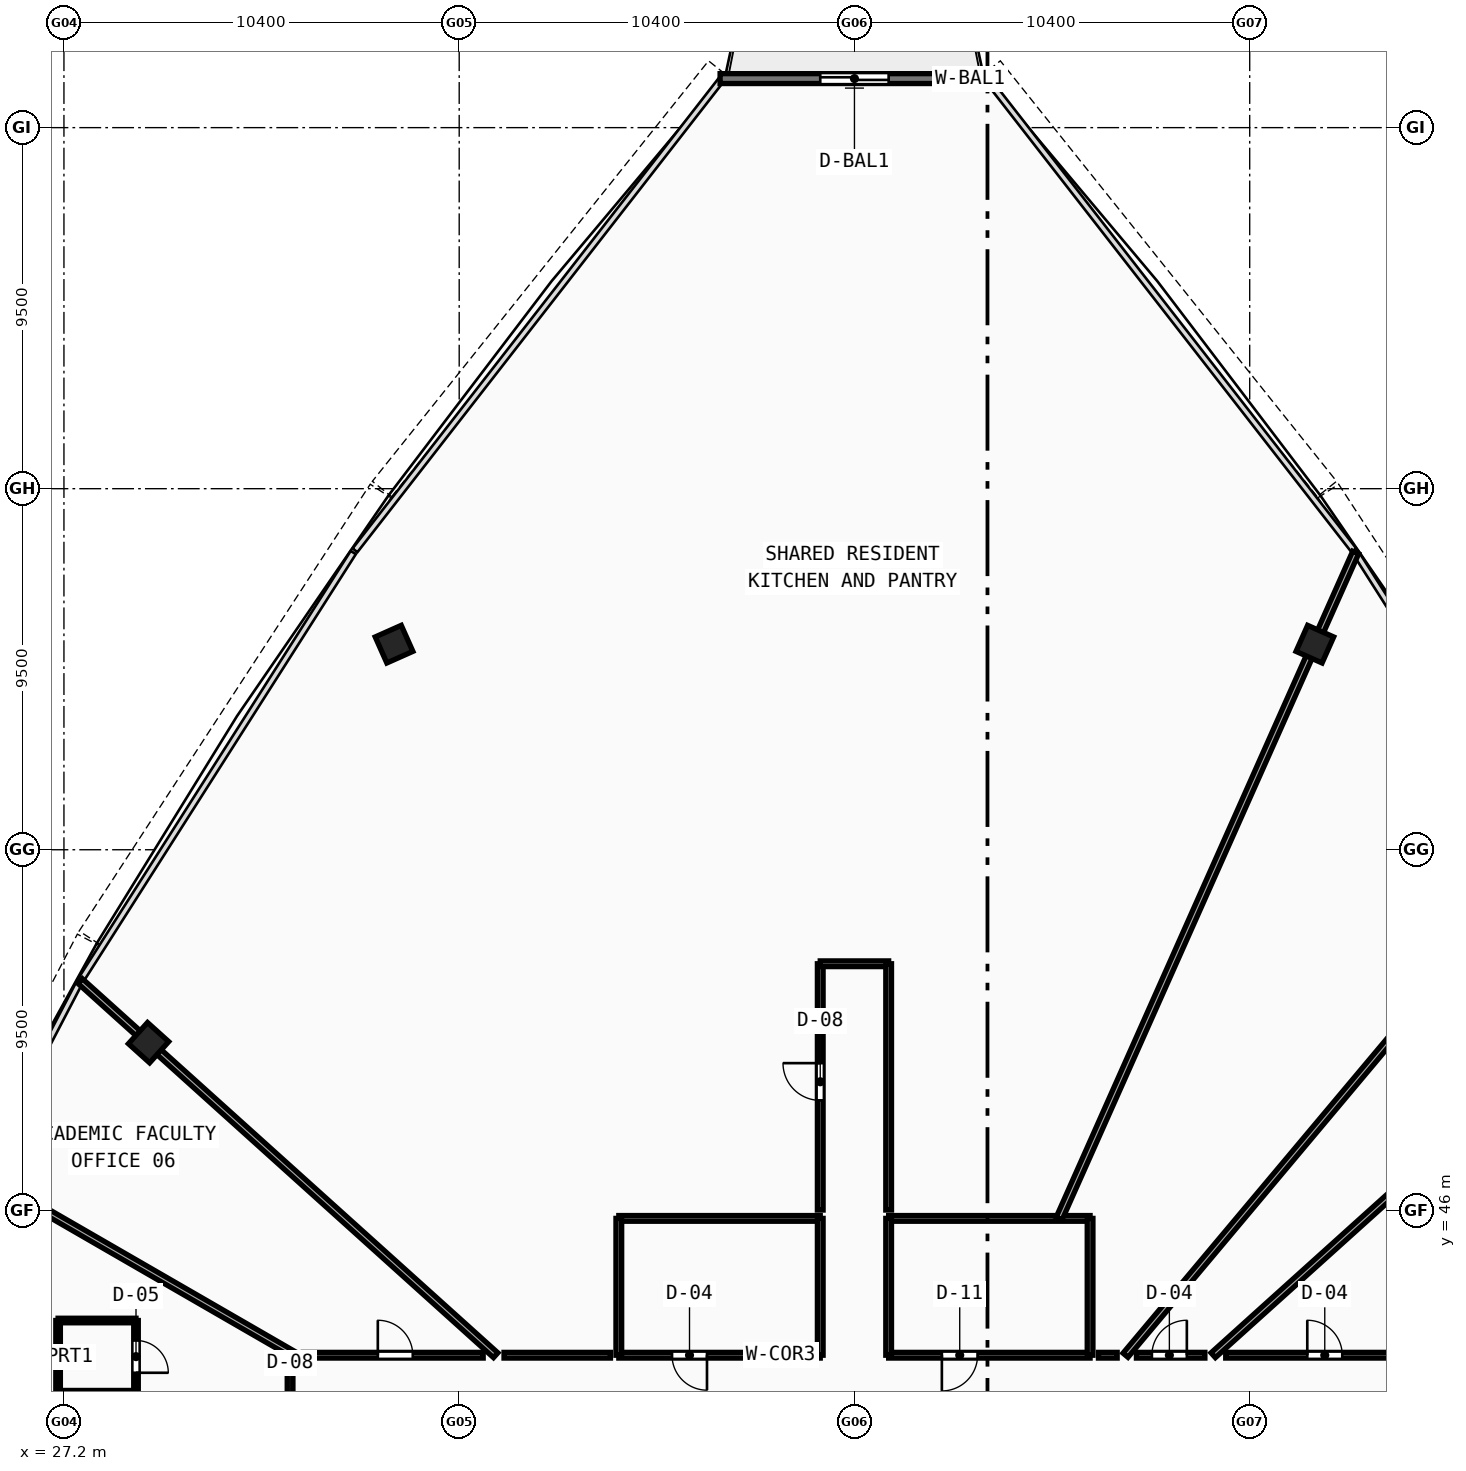
"""IFC4 building model, lengths in metres.
Left out: names, types, materials, properties, quantities, classifications, styles, units other than length and angle.
Written with IfcOpenShell. Run it as: python <this file> out.ifc"""

import sys

from ifc_helpers import new_model, si_unit, direction, frame, frame_2d, origin, origin_with_axes, origin_2d, place, context, subcontext, project, spatial, rectangle, hollow_rectangle, extrude, source, transform, mapped, element, fill, save


model = new_model("IFC4")
c1 = context("Model", 3, precision=1e-05, world=origin(), true_north=direction((0.0, 1.0)))
c2 = subcontext(c1, "Body", "Model", "MODEL_VIEW")
j1 = project(units=[si_unit("LENGTHUNIT", "METRE"), si_unit("PLANEANGLEUNIT", "RADIAN")], contexts=[c1])
p1 = place(None, origin())
s1 = spatial("IfcSite", under=j1, at=p1, CompositionType="ELEMENT")
p2 = place(p1, origin())
s2 = spatial("IfcBuilding", under=s1, at=p2, CompositionType="ELEMENT")
p3 = place(p2, frame((0.0, 0.0, 288.75)))
s3 = spatial("IfcBuildingStorey", under=s2, at=p3, CompositionType="ELEMENT", Elevation=288.75)
m1 = source(origin(), c2, "Body", "SweptSolid", [
    extrude(hollow_rectangle(XDim=0.75, YDim=0.75, WallThickness=0.028, at=origin_2d()), origin(), (0.0, 0.0, 1.0), 3.73),
])
for number, where, z_axis, x_axis in (
    (1, (60.114, 60.909, -0.26), (0.0, 0.0, 1.0), (-0.914, 0.407, 0.0)),
    (2, (35.886, 60.909, -0.26), (0.0, 0.0, 1.0), (-0.914, -0.407, 0.0)),
    (3, (29.427, 50.424, -0.26), (0.0, 0.0, 1.0), (-0.669, -0.743, 0.0)),
):
    element("IfcColumn", number, at=place(p3, frame(where, z_axis=z_axis, x_axis=x_axis)), inside=s3, PredefinedType="COLUMN", context=c2, shape_type="MappedRepresentation", body=[
        mapped(m1, transform((0.0, 0.0, 0.0), scale=1.0)),
    ])
p4 = place(p3, frame((51.535, 75.79, 0.0), z_axis=(0.0, 0.0, 1.0), x_axis=(-1.0, 0.0, 0.0)))
e4 = element("IfcWall", 4, at=p4, inside=s3, PredefinedType="STANDARD", context=c2, shape_type="SweptSolid", body=[
    extrude(rectangle(XDim=7.07, YDim=0.26, at=frame_2d((3.535, 0.0))), origin(), (0.0, 0.0, 1.0), 3.47),
])
p5 = place(p4, frame((2.635, 0.0, 0.0)))
e5 = element("IfcOpeningElement", 5, at=p5, cuts=e4, PredefinedType="OPENING", context=c2, shape_type="SweptSolid", body=[
    extrude(rectangle(XDim=1.8, YDim=2.15, at=frame_2d((0.9, 1.075))), frame((0.0, 0.14, 0.0), z_axis=(0.0, -1.0, 0.0), x_axis=(1.0, 0.0, 0.0)), (0.0, 0.0, 1.0), 0.28),
])
p6 = place(p3, frame((41.8, 42.2, 0.0), z_axis=(0.0, 0.0, 1.0), x_axis=(1.0, 0.0, 0.0)))
e6 = element("IfcWall", 6, at=p6, inside=s3, PredefinedType="PARTITIONING", context=c2, shape_type="SweptSolid", body=[
    extrude(rectangle(XDim=5.3, YDim=0.15, at=frame_2d((2.65, 0.0))), origin(), (0.0, 0.0, 1.0), 2.87),
])
p7 = place(p6, frame((1.4, 0.0, 0.0)))
e7 = element("IfcOpeningElement", 7, at=p7, cuts=e6, PredefinedType="OPENING", context=c2, shape_type="SweptSolid", body=[
    extrude(rectangle(XDim=0.92, YDim=2.1, at=frame_2d((0.46, 1.05))), frame((0.0, 0.085, 0.0), z_axis=(0.0, -1.0, 0.0), x_axis=(1.0, 0.0, 0.0)), (0.0, 0.0, 1.0), 0.17),
])
p8 = place(p3, frame((41.8, 45.8, 0.0), z_axis=(0.0, 0.0, 1.0), x_axis=(1.0, 0.0, 0.0)))
e8 = element("IfcWall", 8, at=p8, inside=s3, PredefinedType="PARTITIONING", context=c2, shape_type="SweptSolid", body=[
    extrude(rectangle(XDim=5.3, YDim=0.15, at=frame_2d((2.65, 0.0))), origin(), (0.0, 0.0, 1.0), 2.87),
])
for number, where, z_axis, x_axis in (
    (9, (41.8, 42.2, 0.0), (0.0, 0.0, 1.0), (0.0, 1.0, 0.0)),
    (10, (47.1, 42.2, 0.0), (0.0, 0.0, 1.0), (0.0, 1.0, 0.0)),
):
    element("IfcWall", number, at=place(p3, frame(where, z_axis=z_axis, x_axis=x_axis)), inside=s3, PredefinedType="PARTITIONING", context=c2, shape_type="SweptSolid", body=[
        extrude(rectangle(XDim=3.6, YDim=0.15, at=frame_2d((1.8, 0.0))), origin(), (0.0, 0.0, 1.0), 3.47),
    ])
p9 = place(p3, frame((48.9, 42.2, 0.0), z_axis=(0.0, 0.0, 1.0), x_axis=(1.0, 0.0, 0.0)))
e11 = element("IfcWall", 11, at=p9, inside=s3, PredefinedType="PARTITIONING", context=c2, shape_type="SweptSolid", body=[
    extrude(rectangle(XDim=5.3, YDim=0.15, at=frame_2d((2.65, 0.0))), origin(), (0.0, 0.0, 1.0), 2.87),
])
p10 = place(p9, frame((1.4, 0.0, 0.0)))
e12 = element("IfcOpeningElement", 12, at=p10, cuts=e11, PredefinedType="OPENING", context=c2, shape_type="SweptSolid", body=[
    extrude(rectangle(XDim=0.94, YDim=2.1, at=frame_2d((0.47, 1.05))), frame((0.0, 0.085, 0.0), z_axis=(0.0, -1.0, 0.0), x_axis=(1.0, 0.0, 0.0)), (0.0, 0.0, 1.0), 0.17),
])
p11 = place(p3, frame((48.9, 45.8, 0.0), z_axis=(0.0, 0.0, 1.0), x_axis=(1.0, 0.0, 0.0)))
e13 = element("IfcWall", 13, at=p11, inside=s3, PredefinedType="PARTITIONING", context=c2, shape_type="SweptSolid", body=[
    extrude(rectangle(XDim=5.3, YDim=0.15, at=frame_2d((2.65, 0.0))), origin(), (0.0, 0.0, 1.0), 2.87),
])
for number, where, z_axis, x_axis in (
    (14, (48.9, 42.2, 0.0), (0.0, 0.0, 1.0), (0.0, 1.0, 0.0)),
    (15, (54.2, 42.2, 0.0), (0.0, 0.0, 1.0), (0.0, 1.0, 0.0)),
):
    element("IfcWall", number, at=place(p3, frame(where, z_axis=z_axis, x_axis=x_axis)), inside=s3, PredefinedType="PARTITIONING", context=c2, shape_type="SweptSolid", body=[
        extrude(rectangle(XDim=3.6, YDim=0.15, at=frame_2d((1.8, 0.0))), origin(), (0.0, 0.0, 1.0), 3.47),
    ])
p12 = place(p3, frame((57.44, 42.2, 0.0), z_axis=(0.0, 0.0, 1.0), x_axis=(0.743145593795, 0.669129753055, 0.0)))
e16 = element("IfcWall", 16, at=p12, inside=s3, PredefinedType="PARTITIONING", context=c2, shape_type="SweptSolid", body=[
    extrude(rectangle(XDim=14.711, YDim=0.17, at=frame_2d((7.355, 0.0))), origin(), (0.0, 0.0, 1.0), 2.87),
])
p13 = place(p3, frame((55.132, 42.2, 0.0), z_axis=(0.0, 0.0, 1.0), x_axis=(0.642779182264, 0.766051514487, 0.0)))
e17 = element("IfcWall", 17, at=p13, inside=s3, PredefinedType="PARTITIONING", context=c2, shape_type="SweptSolid", body=[
    extrude(rectangle(XDim=17.254, YDim=0.17, at=frame_2d((8.627, 0.0))), origin(), (0.0, 0.0, 1.0), 2.87),
])
p14 = place(p3, frame((53.387, 45.8, 0.0), z_axis=(0.0, 0.0, 1.0), x_axis=(0.406740781751, 0.913543614975, 0.0)))
e18 = element("IfcWall", 18, at=p14, inside=s3, PredefinedType="PARTITIONING", context=c2, shape_type="SweptSolid", body=[
    extrude(rectangle(XDim=19.177, YDim=0.17, at=frame_2d((9.589, 0.0))), origin(), (0.0, 0.0, 1.0), 2.87),
])
p15 = place(p3, frame((38.56, 42.2, 0.0), z_axis=(0.0, 0.0, 1.0), x_axis=(-0.743145593795, 0.669129753055, 0.0)))
e19 = element("IfcWall", 19, at=p15, inside=s3, PredefinedType="PARTITIONING", context=c2, shape_type="SweptSolid", body=[
    extrude(rectangle(XDim=14.711, YDim=0.17, at=frame_2d((7.355, 0.0))), origin(), (0.0, 0.0, 1.0), 2.87),
])
p16 = place(p3, frame((33.278, 42.2, 0.0), z_axis=(0.0, 0.0, 1.0), x_axis=(-0.866033492747, 0.499985989244, 0.0)))
e20 = element("IfcWall", 20, at=p16, inside=s3, PredefinedType="PARTITIONING", context=c2, shape_type="SweptSolid", body=[
    extrude(rectangle(XDim=9.57, YDim=0.17, at=frame_2d((4.785, 0.0))), origin(), (0.0, 0.0, 1.0), 2.87),
])
p17 = place(p3, frame((33.15, 38.525, 0.0), z_axis=(0.0, 0.0, 1.0), x_axis=(-0.951060099206, 0.309005967092, 0.0)))
e21 = element("IfcWall", 21, at=p17, inside=s3, PredefinedType="PARTITIONING", context=c2, shape_type="SweptSolid", body=[
    extrude(rectangle(XDim=11.302, YDim=0.17, at=frame_2d((5.651, 0.0))), origin(), (0.0, 0.0, 1.0), 2.87),
])
p18 = place(p3, frame((33.15, 38.756, 0.0), z_axis=(0.0, 0.0, 1.0), x_axis=(0.0, 1.0, 0.0)))
e22 = element("IfcWall", 22, at=p18, inside=s3, PredefinedType="PARTITIONING", context=c2, shape_type="SweptSolid", body=[
    extrude(rectangle(XDim=3.263, YDim=0.15, at=frame_2d((1.632, 0.0))), origin(), (0.0, 0.0, 1.0), 3.12),
])
p19 = place(p18, frame((1.14, 0.0, 0.0)))
e23 = element("IfcOpeningElement", 23, at=p19, cuts=e22, PredefinedType="OPENING", context=c2, shape_type="SweptSolid", body=[
    extrude(rectangle(XDim=0.98, YDim=2.12, at=frame_2d((0.49, 1.06))), frame((0.0, 0.085, 0.0), z_axis=(0.0, -1.0, 0.0), x_axis=(1.0, 0.0, 0.0)), (0.0, 0.0, 1.0), 0.17),
])
p20 = place(p3, frame((33.497, 42.2, 0.0), z_axis=(0.0, 0.0, 1.0), x_axis=(1.0, 0.0, 0.0)))
e24 = element("IfcWall", 24, at=p20, inside=s3, PredefinedType="PARTITIONING", context=c2, shape_type="SweptSolid", body=[
    extrude(rectangle(XDim=4.734, YDim=0.15, at=frame_2d((2.367, 0.0))), origin(), (0.0, 0.0, 1.0), 3.12),
])
p21 = place(p20, frame((1.961, 0.0, 0.0)))
e25 = element("IfcOpeningElement", 25, at=p21, cuts=e24, PredefinedType="OPENING", context=c2, shape_type="SweptSolid", body=[
    extrude(rectangle(XDim=0.92, YDim=2.1, at=frame_2d((0.46, 1.05))), frame((0.0, 0.085, 0.0), z_axis=(0.0, -1.0, 0.0), x_axis=(1.0, 0.0, 0.0)), (0.0, 0.0, 1.0), 0.17),
])
p22 = place(p3, frame((38.78, 42.2, 0.0), z_axis=(0.0, 0.0, 1.0), x_axis=(1.0, 0.0, 0.0)))
e26 = element("IfcWall", 26, at=p22, inside=s3, PredefinedType="PARTITIONING", context=c2, shape_type="SweptSolid", body=[
    extrude(rectangle(XDim=2.801, YDim=0.15, at=frame_2d((1.4, 0.0))), origin(), (0.0, 0.0, 1.0), 2.87),
])
p23 = place(p3, frame((47.1, 46.02, 0.0), z_axis=(0.0, 0.0, 1.0), x_axis=(0.0, 1.0, 0.0)))
e27 = element("IfcWall", 27, at=p23, inside=s3, PredefinedType="PARTITIONING", context=c2, shape_type="SweptSolid", body=[
    extrude(rectangle(XDim=6.48, YDim=0.15, at=frame_2d((3.24, 0.0))), origin(), (0.0, 0.0, 1.0), 3.12),
])
p24 = place(p23, frame((2.885, 0.0, 0.0)))
e28 = element("IfcOpeningElement", 28, at=p24, cuts=e27, PredefinedType="OPENING", context=c2, shape_type="SweptSolid", body=[
    extrude(rectangle(XDim=0.98, YDim=2.12, at=frame_2d((0.49, 1.06))), frame((0.0, 0.085, 0.0), z_axis=(0.0, -1.0, 0.0), x_axis=(1.0, 0.0, 0.0)), (0.0, 0.0, 1.0), 0.17),
])
p25 = place(p3, frame((47.1, 52.5, 0.0), z_axis=(0.0, 0.0, 1.0), x_axis=(1.0, 0.0, 0.0)))
e29 = element("IfcWall", 29, at=p25, inside=s3, PredefinedType="PARTITIONING", context=c2, shape_type="SweptSolid", body=[
    extrude(rectangle(XDim=1.8, YDim=0.15, at=frame_2d((0.9, 0.0))), origin(), (0.0, 0.0, 1.0), 3.47),
])
p26 = place(p3, frame((48.9, 52.5, 0.0), z_axis=(0.0, 0.0, 1.0), x_axis=(0.0, -1.0, 0.0)))
e30 = element("IfcWall", 30, at=p26, inside=s3, PredefinedType="PARTITIONING", context=c2, shape_type="SweptSolid", body=[
    extrude(rectangle(XDim=6.48, YDim=0.15, at=frame_2d((3.24, 0.0))), origin(), (0.0, 0.0, 1.0), 3.12),
])
p27 = place(p3, frame((54.42, 42.2, 0.0), z_axis=(0.0, 0.0, 1.0), x_axis=(1.0, 0.0, 0.0)))
e31 = element("IfcWall", 31, at=p27, inside=s3, PredefinedType="PARTITIONING", context=c2, shape_type="SweptSolid", body=[
    extrude(rectangle(XDim=0.492, YDim=0.15, at=frame_2d((0.246, 0.0))), origin(), (0.0, 0.0, 1.0), 3.47),
])
p28 = place(p3, frame((55.419, 42.2, 0.0), z_axis=(0.0, 0.0, 1.0), x_axis=(1.0, 0.0, 0.0)))
e32 = element("IfcWall", 32, at=p28, inside=s3, PredefinedType="PARTITIONING", context=c2, shape_type="SweptSolid", body=[
    extrude(rectangle(XDim=1.801, YDim=0.15, at=frame_2d((0.9, 0.0))), origin(), (0.0, 0.0, 1.0), 2.87),
])
p29 = place(p28, frame((0.407, 0.0, 0.0)))
e33 = element("IfcOpeningElement", 33, at=p29, cuts=e32, PredefinedType="OPENING", context=c2, shape_type="SweptSolid", body=[
    extrude(rectangle(XDim=0.92, YDim=2.1, at=frame_2d((0.46, 1.05))), frame((0.0, 0.085, 0.0), z_axis=(0.0, -1.0, 0.0), x_axis=(1.0, 0.0, 0.0)), (0.0, 0.0, 1.0), 0.17),
])
p30 = place(p3, frame((57.769, 42.2, 0.0), z_axis=(0.0, 0.0, 1.0), x_axis=(1.0, 0.0, 0.0)))
e34 = element("IfcWall", 34, at=p30, inside=s3, PredefinedType="PARTITIONING", context=c2, shape_type="SweptSolid", body=[
    extrude(rectangle(XDim=5.081, YDim=0.15, at=frame_2d((2.541, 0.0))), origin(), (0.0, 0.0, 1.0), 3.12),
])
p31 = place(p30, frame((2.146, 0.0, 0.0)))
e35 = element("IfcOpeningElement", 35, at=p31, cuts=e34, PredefinedType="OPENING", context=c2, shape_type="SweptSolid", body=[
    extrude(rectangle(XDim=0.92, YDim=2.1, at=frame_2d((0.46, 1.05))), frame((0.0, 0.085, 0.0), z_axis=(0.0, -1.0, 0.0), x_axis=(1.0, 0.0, 0.0)), (0.0, 0.0, 1.0), 0.17),
])
p32 = place(p3, frame((27.046, 41.213, 0.0), z_axis=(0.0, 0.0, 1.0), x_axis=(1.0, 0.0, 0.0)))
e36 = element("IfcWall", 36, at=p32, inside=s3, PredefinedType="PARTITIONING", context=c2, shape_type="SweptSolid", body=[
    extrude(rectangle(XDim=2.05, YDim=0.12, at=frame_2d((1.025, 0.0))), origin(), (0.0, 0.0, 1.0), 3.12),
])
p33 = place(p3, frame((29.096, 41.213, 0.0), z_axis=(0.0, 0.0, 1.0), x_axis=(0.0, 1.0, 0.0)))
e37 = element("IfcWall", 37, at=p33, inside=s3, PredefinedType="PARTITIONING", context=c2, shape_type="SweptSolid", body=[
    extrude(rectangle(XDim=1.9, YDim=0.12, at=frame_2d((0.95, 0.0))), origin(), (0.0, 0.0, 1.0), 3.12),
])
p34 = place(p33, frame((0.525, 0.0, 0.0)))
e38 = element("IfcOpeningElement", 38, at=p34, cuts=e37, PredefinedType="OPENING", context=c2, shape_type="SweptSolid", body=[
    extrude(rectangle(XDim=0.85, YDim=2.1, at=frame_2d((0.425, 1.05))), frame((0.0, 0.07, 0.0), z_axis=(0.0, -1.0, 0.0), x_axis=(1.0, 0.0, 0.0)), (0.0, 0.0, 1.0), 0.14),
])
p35 = place(p3, frame((29.096, 43.113, 0.0), z_axis=(0.0, 0.0, 1.0), x_axis=(-1.0, 0.0, 0.0)))
e39 = element("IfcWall", 39, at=p35, inside=s3, PredefinedType="PARTITIONING", context=c2, shape_type="SweptSolid", body=[
    extrude(rectangle(XDim=2.05, YDim=0.12, at=frame_2d((1.025, 0.0))), origin(), (0.0, 0.0, 1.0), 3.47),
])
p36 = place(p3, frame((27.046, 43.113, 0.0), z_axis=(0.0, 0.0, 1.0), x_axis=(0.0, -1.0, 0.0)))
e40 = element("IfcWall", 40, at=p36, inside=s3, PredefinedType="PARTITIONING", context=c2, shape_type="SweptSolid", body=[
    extrude(rectangle(XDim=1.9, YDim=0.12, at=frame_2d((0.95, 0.0))), origin(), (0.0, 0.0, 1.0), 3.47),
])
m2 = source(origin(), c2, "Body", "SweptSolid", [
    extrude(rectangle(XDim=1.8, YDim=2.15, at=frame_2d((0.9, 1.075))), frame((0.0, 0.025, 0.0), z_axis=(0.0, -1.0, 0.0), x_axis=(1.0, 0.0, 0.0)), (0.0, 0.0, 1.0), 0.05),
])
p37 = place(p5, origin_with_axes())
e41 = element("IfcDoor", 41, at=p37, inside=s3, OperationType="DOUBLE_DOOR_SLIDING", PredefinedType="DOOR", context=c2, shape_type="MappedRepresentation", body=[
    mapped(m2, transform((0.0, 0.0, 0.0), scale=1.0)),
])
fill(e5, e41)
m3 = source(origin(), c2, "Body", "SweptSolid", [
    extrude(rectangle(XDim=0.92, YDim=2.1, at=frame_2d((0.46, 1.05))), frame((0.0, 0.025, 0.0), z_axis=(0.0, -1.0, 0.0), x_axis=(1.0, 0.0, 0.0)), (0.0, 0.0, 1.0), 0.05),
])
p38 = place(p7, frame((0.92, 0.0, 0.0), z_axis=(0.0, 0.0, 1.0), x_axis=(-1.0, 0.0, 0.0)))
e42 = element("IfcDoor", 42, at=p38, inside=s3, OperationType="SINGLE_SWING_LEFT", PredefinedType="DOOR", context=c2, shape_type="MappedRepresentation", body=[
    mapped(m3, transform((0.0, 0.0, 0.0), scale=1.0)),
])
fill(e7, e42)
m4 = source(origin(), c2, "Body", "SweptSolid", [
    extrude(rectangle(XDim=0.94, YDim=2.1, at=frame_2d((0.47, 1.05))), frame((0.0, 0.025, 0.0), z_axis=(0.0, -1.0, 0.0), x_axis=(1.0, 0.0, 0.0)), (0.0, 0.0, 1.0), 0.05),
])
p39 = place(p10, frame((0.94, 0.0, 0.0), z_axis=(0.0, 0.0, 1.0), x_axis=(-1.0, 0.0, 0.0)))
e43 = element("IfcDoor", 43, at=p39, inside=s3, OperationType="SINGLE_SWING_RIGHT", PredefinedType="DOOR", context=c2, shape_type="MappedRepresentation", body=[
    mapped(m4, transform((0.0, 0.0, 0.0), scale=1.0)),
])
fill(e12, e43)
p40 = place(p31, origin_with_axes())
e44 = element("IfcDoor", 44, at=p40, inside=s3, OperationType="SINGLE_SWING_LEFT", PredefinedType="DOOR", context=c2, shape_type="MappedRepresentation", body=[
    mapped(m3, transform((0.0, 0.0, 0.0), scale=1.0)),
])
fill(e35, e44)
p41 = place(p29, origin_with_axes())
e45 = element("IfcDoor", 45, at=p41, inside=s3, OperationType="SINGLE_SWING_RIGHT", PredefinedType="DOOR", context=c2, shape_type="MappedRepresentation", body=[
    mapped(m3, transform((0.0, 0.0, 0.0), scale=1.0)),
])
fill(e33, e45)
m5 = source(origin(), c2, "Body", "SweptSolid", [
    extrude(rectangle(XDim=0.98, YDim=2.12, at=frame_2d((0.49, 1.06))), frame((0.0, 0.025, 0.0), z_axis=(0.0, -1.0, 0.0), x_axis=(1.0, 0.0, 0.0)), (0.0, 0.0, 1.0), 0.05),
])
p42 = place(p24, origin_with_axes())
e46 = element("IfcDoor", 46, at=p42, inside=s3, OperationType="SINGLE_SWING_RIGHT", PredefinedType="DOOR", context=c2, shape_type="MappedRepresentation", body=[
    mapped(m5, transform((0.0, 0.0, 0.0), scale=1.0)),
])
fill(e28, e46)
p43 = place(p21, origin_with_axes())
e47 = element("IfcDoor", 47, at=p43, inside=s3, OperationType="SINGLE_SWING_LEFT", PredefinedType="DOOR", context=c2, shape_type="MappedRepresentation", body=[
    mapped(m3, transform((0.0, 0.0, 0.0), scale=1.0)),
])
fill(e25, e47)
m6 = source(origin(), c2, "Body", "SweptSolid", [
    extrude(rectangle(XDim=0.85, YDim=2.1, at=frame_2d((0.425, 1.05))), frame((0.0, 0.025, 0.0), z_axis=(0.0, -1.0, 0.0), x_axis=(1.0, 0.0, 0.0)), (0.0, 0.0, 1.0), 0.05),
])
p44 = place(p34, frame((0.85, 0.0, 0.0), z_axis=(0.0, 0.0, 1.0), x_axis=(-1.0, 0.0, 0.0)))
e48 = element("IfcDoor", 48, at=p44, inside=s3, OperationType="SINGLE_SWING_RIGHT", PredefinedType="DOOR", context=c2, shape_type="MappedRepresentation", body=[
    mapped(m6, transform((0.0, 0.0, 0.0), scale=1.0)),
])
fill(e38, e48)
save(model, sys.argv[1])
